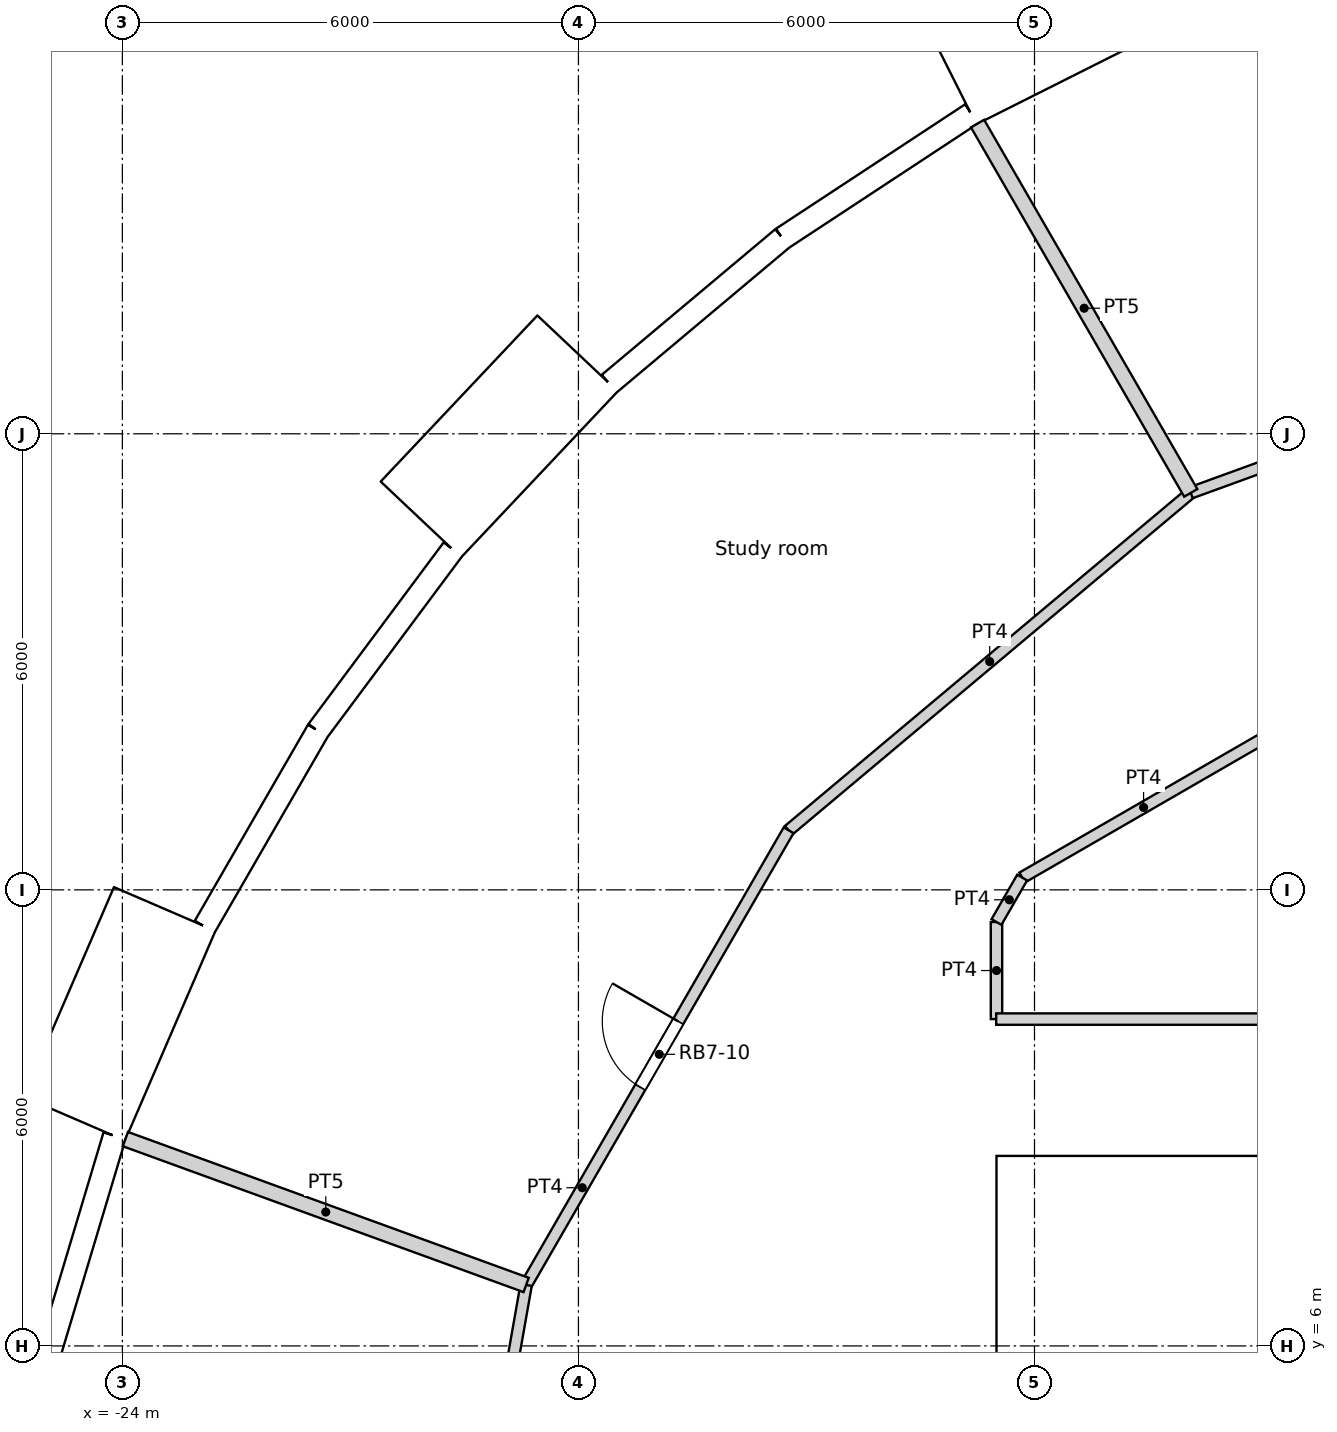
"""IFC4 building model, lengths in metres.
Left out: names, types, materials, properties, quantities, classifications, styles, units other than length and angle.
Written with IfcOpenShell. Run it as: python <this file> out.ifc"""

import sys

from ifc_helpers import new_model, si_unit, direction, frame, frame_2d, origin, origin_2d, place, context, subcontext, project, spatial, rectangle, circle, extrude, element, fill, save


model = new_model("IFC4")
c1 = context("Model", 3, precision=1e-05, world=origin(), true_north=direction((0.0, 1.0)))
c2 = subcontext(c1, "Body", "Model", "MODEL_VIEW")
j1 = project(units=[si_unit("LENGTHUNIT", "METRE"), si_unit("PLANEANGLEUNIT", "RADIAN")], contexts=[c1])
p1 = place(None, origin())
s1 = spatial("IfcSite", under=j1, at=p1, CompositionType="ELEMENT")
p2 = place(p1, origin())
s2 = spatial("IfcBuilding", under=s1, at=p2, CompositionType="ELEMENT")
p3 = place(p2, frame((0.0, 0.0, 190.8)))
s3 = spatial("IfcBuildingStorey", under=s2, at=p3, CompositionType="ELEMENT", Elevation=190.8)
for number, where, z_axis, x_axis in (
    (1, (-12.274, 21.259, 0.0), (0.0, 0.0, 1.0), (1.0, 0.0, 0.0)),
    (2, (-16.846, 17.855, 0.0), (0.0, 0.0, 1.0), (1.0, 0.0, 0.0)),
    (3, (-20.509, 13.489, 0.0), (0.0, 0.0, 1.0), (1.0, 0.0, 0.0)),
    (4, (-23.067, 8.396, 0.0), (0.0, 0.0, 1.0), (1.0, 0.0, 0.0)),
):
    element("IfcColumn", number, at=place(p3, frame(where, z_axis=z_axis, x_axis=x_axis)), inside=s3, PredefinedType="COLUMN", context=c2, shape_type="SweptSolid", body=[
        extrude(circle(Radius=0.6, at=origin_2d()), origin(), (0.0, 0.0, 1.0), 3.6),
    ])
for number, where, z_axis, x_axis in (
    (5, (-9.411, 16.301, 0.0), (0.0, 0.0, 1.0), (1.0, 0.0, 0.0)),
    (6, (-13.798, 12.802, 0.0), (0.0, 0.0, 1.0), (1.0, 0.0, 0.0)),
    (7, (-16.958, 8.167, 0.0), (0.0, 0.0, 1.0), (1.0, 0.0, 0.0)),
):
    element("IfcColumn", number, at=place(p3, frame(where, z_axis=z_axis, x_axis=x_axis)), inside=s3, PredefinedType="COLUMN", context=c2, shape_type="SweptSolid", body=[
        extrude(circle(Radius=0.65, at=origin_2d()), origin(), (0.0, 0.0, 1.0), 3.6),
    ])
p4 = place(p3, frame((-10.409, 24.068, -0.3), z_axis=(0.0, 0.0, 1.0), x_axis=(-0.893628249713, -0.448807922518, 0.0)))
e8 = element("IfcWall", 8, at=p4, inside=s3, PredefinedType="ELEMENTEDWALL", context=c2, shape_type="SweptSolid", body=[
    extrude(rectangle(XDim=3.0, YDim=1.45, at=frame_2d((1.5, 0.0))), origin(), (0.0, 0.0, 1.0), 3.6),
])
p5 = place(p4, frame((1.5, 0.0, 1.85)))
e9 = element("IfcOpeningElement", 9, at=p5, cuts=e8, PredefinedType="OPENING", context=c2, shape_type="SweptSolid", body=[
    extrude(circle(Radius=0.9, at=origin_2d()), frame((0.0, 0.735, 0.0), z_axis=(0.0, -1.0, 0.0), x_axis=(1.0, 0.0, 0.0)), (0.0, 0.0, 1.0), 1.47),
])
p6 = place(p3, frame((-12.832, 22.206, 0.0), z_axis=(0.0, 0.0, 1.0), x_axis=(-0.835508361394, -0.54947773207, 0.0)))
e10 = element("IfcWall", 10, at=p6, inside=s3, PredefinedType="SOLIDWALL", context=c2, shape_type="SweptSolid", body=[
    extrude(rectangle(XDim=2.973, YDim=0.3, at=frame_2d((1.486, 0.0))), origin(), (0.0, 0.0, 1.0), 2.8),
])
p7 = place(p6, frame((1.486, 0.0, 1.55)))
e11 = element("IfcOpeningElement", 11, at=p7, cuts=e10, PredefinedType="OPENING", context=c2, shape_type="SweptSolid", body=[
    extrude(circle(Radius=0.9, at=origin_2d()), frame((0.0, 0.16, 0.0), z_axis=(0.0, -1.0, 0.0), x_axis=(1.0, 0.0, 0.0)), (0.0, 0.0, 1.0), 0.32),
])
p8 = place(p3, frame((-15.316, 20.573, 0.0), z_axis=(0.0, 0.0, 1.0), x_axis=(-0.766008913364, -0.642829950023, 0.0)))
e12 = element("IfcWall", 12, at=p8, inside=s3, PredefinedType="SOLIDWALL", context=c2, shape_type="SweptSolid", body=[
    extrude(rectangle(XDim=2.973, YDim=0.3, at=frame_2d((1.486, 0.0))), origin(), (0.0, 0.0, 1.0), 3.3),
])
p9 = place(p8, frame((1.486, 0.0, 1.55)))
e13 = element("IfcOpeningElement", 13, at=p9, cuts=e12, PredefinedType="OPENING", context=c2, shape_type="SweptSolid", body=[
    extrude(circle(Radius=0.9, at=origin_2d()), frame((0.0, 0.16, 0.0), z_axis=(0.0, -1.0, 0.0), x_axis=(1.0, 0.0, 0.0)), (0.0, 0.0, 1.0), 0.32),
])
p10 = place(p3, frame((-18.013, 19.056, -0.3), z_axis=(0.0, 0.0, 1.0), x_axis=(-0.686217177108, -0.727396718334, 0.0)))
e14 = element("IfcWall", 14, at=p10, inside=s3, PredefinedType="ELEMENTEDWALL", context=c2, shape_type="SweptSolid", body=[
    extrude(rectangle(XDim=3.0, YDim=1.45, at=frame_2d((1.5, 0.0))), origin(), (0.0, 0.0, 1.0), 3.6),
])
p11 = place(p10, frame((1.5, 0.0, 1.85)))
e15 = element("IfcOpeningElement", 15, at=p11, cuts=e14, PredefinedType="OPENING", context=c2, shape_type="SweptSolid", body=[
    extrude(circle(Radius=0.9, at=origin_2d()), frame((0.0, 0.735, 0.0), z_axis=(0.0, -1.0, 0.0), x_axis=(1.0, 0.0, 0.0)), (0.0, 0.0, 1.0), 1.47),
])
p12 = place(p3, frame((-19.653, 16.478, 0.0), z_axis=(0.0, 0.0, 1.0), x_axis=(-0.597197580538, -0.80209416517, 0.0)))
e16 = element("IfcWall", 16, at=p12, inside=s3, PredefinedType="SOLIDWALL", context=c2, shape_type="SweptSolid", body=[
    extrude(rectangle(XDim=2.973, YDim=0.3, at=frame_2d((1.486, 0.0))), origin(), (0.0, 0.0, 1.0), 2.8),
])
p13 = place(p12, frame((1.486, 0.0, 1.55)))
e17 = element("IfcOpeningElement", 17, at=p13, cuts=e16, PredefinedType="OPENING", context=c2, shape_type="SweptSolid", body=[
    extrude(circle(Radius=0.9, at=origin_2d()), frame((0.0, 0.16, 0.0), z_axis=(0.0, -1.0, 0.0), x_axis=(1.0, 0.0, 0.0)), (0.0, 0.0, 1.0), 0.32),
])
p14 = place(p3, frame((-21.428, 14.094, 0.0), z_axis=(0.0, 0.0, 1.0), x_axis=(-0.499954672104, -0.866051572276, 0.0)))
e18 = element("IfcWall", 18, at=p14, inside=s3, PredefinedType="SOLIDWALL", context=c2, shape_type="SweptSolid", body=[
    extrude(rectangle(XDim=2.973, YDim=0.3, at=frame_2d((1.486, 0.0))), origin(), (0.0, 0.0, 1.0), 3.3),
])
p15 = place(p14, frame((1.486, 0.0, 1.55)))
e19 = element("IfcOpeningElement", 19, at=p15, cuts=e18, PredefinedType="OPENING", context=c2, shape_type="SweptSolid", body=[
    extrude(circle(Radius=0.9, at=origin_2d()), frame((0.0, 0.16, 0.0), z_axis=(0.0, -1.0, 0.0), x_axis=(1.0, 0.0, 0.0)), (0.0, 0.0, 1.0), 0.32),
])
p16 = place(p3, frame((-23.444, 11.746, -0.3), z_axis=(0.0, 0.0, 1.0), x_axis=(-0.396079003245, -0.918216435917, 0.0)))
e20 = element("IfcWall", 20, at=p16, inside=s3, PredefinedType="ELEMENTEDWALL", context=c2, shape_type="SweptSolid", body=[
    extrude(rectangle(XDim=3.0, YDim=1.45, at=frame_2d((1.5, 0.0))), origin(), (0.0, 0.0, 1.0), 3.6),
])
p17 = place(p16, frame((1.5, 0.0, 1.85)))
e21 = element("IfcOpeningElement", 21, at=p17, cuts=e20, PredefinedType="OPENING", context=c2, shape_type="SweptSolid", body=[
    extrude(circle(Radius=0.9, at=origin_2d()), frame((0.0, 0.735, 0.0), z_axis=(0.0, -1.0, 0.0), x_axis=(1.0, 0.0, 0.0)), (0.0, 0.0, 1.0), 1.47),
])
p18 = place(p3, frame((-24.104, 8.763, 0.0), z_axis=(0.0, 0.0, 1.0), x_axis=(-0.286782750849, -0.957995643944, 0.0)))
e22 = element("IfcWall", 22, at=p18, inside=s3, PredefinedType="SOLIDWALL", context=c2, shape_type="SweptSolid", body=[
    extrude(rectangle(XDim=2.973, YDim=0.3, at=frame_2d((1.486, 0.0))), origin(), (0.0, 0.0, 1.0), 2.8),
])
p19 = place(p18, frame((1.486, 0.0, 1.55)))
e23 = element("IfcOpeningElement", 23, at=p19, cuts=e22, PredefinedType="OPENING", context=c2, shape_type="SweptSolid", body=[
    extrude(circle(Radius=0.9, at=origin_2d()), frame((0.0, 0.16, 0.0), z_axis=(0.0, -1.0, 0.0), x_axis=(1.0, 0.0, 0.0)), (0.0, 0.0, 1.0), 0.32),
])
p20 = place(p3, frame((-24.956, 5.915, 0.0), z_axis=(0.0, 0.0, 1.0), x_axis=(-0.173686952598, -0.984800915159, 0.0)))
e24 = element("IfcWall", 24, at=p20, inside=s3, PredefinedType="SOLIDWALL", context=c2, shape_type="SweptSolid", body=[
    extrude(rectangle(XDim=2.973, YDim=0.3, at=frame_2d((1.486, 0.0))), origin(), (0.0, 0.0, 1.0), 3.3),
])
p21 = place(p20, frame((1.486, 0.0, 1.55)))
e25 = element("IfcOpeningElement", 25, at=p21, cuts=e24, PredefinedType="OPENING", context=c2, shape_type="SweptSolid", body=[
    extrude(circle(Radius=0.9, at=origin_2d()), frame((0.0, 0.16, 0.0), z_axis=(0.0, -1.0, 0.0), x_axis=(1.0, 0.0, 0.0)), (0.0, 0.0, 1.0), 0.32),
])
p22 = place(p3, frame((-12.5, 8.05, 0.0), z_axis=(0.0, 0.0, 1.0), x_axis=(1.0, 0.0, 0.0)))
e26 = element("IfcWall", 26, at=p22, inside=s3, PredefinedType="SOLIDWALL", context=c2, shape_type="SweptSolid", body=[
    extrude(rectangle(XDim=25.0, YDim=0.9, at=frame_2d((12.5, 0.0))), origin(), (0.0, 0.0, 1.0), 3.6),
])
p23 = place(p22, frame((8.3, 0.0, 0.0)))
e27 = element("IfcOpeningElement", 27, at=p23, cuts=e26, PredefinedType="OPENING", context=c2, shape_type="SweptSolid", body=[
    extrude(rectangle(XDim=1.8, YDim=2.1, at=frame_2d((0.9, 1.05))), frame((0.0, 0.45, 0.0), z_axis=(0.0, -1.0, 0.0), x_axis=(1.0, 0.0, 0.0)), (0.0, 0.0, 1.0), 0.9),
])
p24 = place(p3, frame((-12.05, -7.6, 0.0), z_axis=(0.0, 0.0, 1.0), x_axis=(0.0, 1.0, 0.0)))
e28 = element("IfcWall", 28, at=p24, inside=s3, PredefinedType="SOLIDWALL", context=c2, shape_type="SweptSolid", body=[
    extrude(rectangle(XDim=15.2, YDim=0.9, at=frame_2d((7.6, 0.0))), origin(), (0.0, 0.0, 1.0), 3.6),
])
p25 = place(p24, frame((7.1, 0.0, 0.0)))
e29 = element("IfcOpeningElement", 29, at=p25, cuts=e28, PredefinedType="OPENING", context=c2, shape_type="SweptSolid", body=[
    extrude(rectangle(XDim=1.0, YDim=2.1, at=frame_2d((0.5, 1.05))), frame((0.0, 0.45, 0.0), z_axis=(0.0, -1.0, 0.0), x_axis=(1.0, 0.0, 0.0)), (0.0, 0.0, 1.0), 0.9),
])
p26 = place(p3, frame((-9.05, -7.0, 0.0), z_axis=(0.0, 0.0, 1.0), x_axis=(0.0, 1.0, 0.0)))
e30 = element("IfcWall", 30, at=p26, inside=s3, PredefinedType="SOLIDWALL", context=c2, shape_type="SweptSolid", body=[
    extrude(rectangle(XDim=14.6, YDim=0.3, at=frame_2d((7.3, 0.0))), origin(), (0.0, 0.0, 1.0), 3.3),
])
p27 = place(p3, frame((-12.504, 10.3, 0.0), z_axis=(0.0, 0.0, 1.0), x_axis=(1.0, 0.0, 0.0)))
e31 = element("IfcWall", 31, at=p27, inside=s3, PredefinedType="PARTITIONING", context=c2, shape_type="SweptSolid", body=[
    extrude(rectangle(XDim=7.687, YDim=0.15, at=frame_2d((3.844, 0.0))), origin(), (0.0, 0.0, 1.0), 3.3),
])
p28 = place(p3, frame((-12.162, 12.162, 0.0), z_axis=(0.0, 0.0, 1.0), x_axis=(0.866004766557, 0.500035743023, 0.0)))
e32 = element("IfcWall", 32, at=p28, inside=s3, PredefinedType="PARTITIONING", context=c2, shape_type="SweptSolid", body=[
    extrude(rectangle(XDim=8.477, YDim=0.15, at=frame_2d((4.239, 0.0))), origin(), (0.0, 0.0, 1.0), 3.3),
])
p29 = place(p28, frame((3.739, 0.0, 0.0)))
e33 = element("IfcOpeningElement", 33, at=p29, cuts=e32, PredefinedType="OPENING", context=c2, shape_type="SweptSolid", body=[
    extrude(rectangle(XDim=1.0, YDim=2.04, at=frame_2d((0.5, 1.02))), frame((0.0, 0.075, 0.0), z_axis=(0.0, -1.0, 0.0), x_axis=(1.0, 0.0, 0.0)), (0.0, 0.0, 1.0), 0.15),
])
p30 = place(p3, frame((-9.944, 17.223, 0.0), z_axis=(0.0, 0.0, 1.0), x_axis=(0.939672634566, 0.342075050021, 0.0)))
e34 = element("IfcWall", 34, at=p30, inside=s3, PredefinedType="PARTITIONING", context=c2, shape_type="SweptSolid", body=[
    extrude(rectangle(XDim=6.908, YDim=0.15, at=frame_2d((3.454, 0.0))), origin(), (0.0, 0.0, 1.0), 3.3),
])
p31 = place(p30, frame((2.704, 0.0, 0.0)))
e35 = element("IfcOpeningElement", 35, at=p31, cuts=e34, PredefinedType="OPENING", context=c2, shape_type="SweptSolid", body=[
    extrude(rectangle(XDim=1.5, YDim=2.1, at=frame_2d((0.75, 1.05))), frame((0.0, 0.075, 0.0), z_axis=(0.0, -1.0, 0.0), x_axis=(1.0, 0.0, 0.0)), (0.0, 0.0, 1.0), 0.15),
])
p32 = place(p3, frame((-15.235, 12.784, 0.0), z_axis=(0.0, 0.0, 1.0), x_axis=(0.766064078986, 0.642764207845, 0.0)))
e36 = element("IfcWall", 36, at=p32, inside=s3, PredefinedType="PARTITIONING", context=c2, shape_type="SweptSolid", body=[
    extrude(rectangle(XDim=6.906, YDim=0.15, at=frame_2d((3.453, 0.0))), origin(), (0.0, 0.0, 1.0), 3.3),
])
p33 = place(p3, frame((-12.5, 11.577, 0.0), z_axis=(0.0, 0.0, 1.0), x_axis=(0.500024767483, 0.866011103799, 0.0)))
e37 = element("IfcWall", 37, at=p33, inside=s3, PredefinedType="PARTITIONING", context=c2, shape_type="SweptSolid", body=[
    extrude(rectangle(XDim=0.676, YDim=0.15, at=frame_2d((0.338, 0.0))), origin(), (0.0, 0.0, 1.0), 3.3),
])
p34 = place(p3, frame((-12.5, 10.3, 0.0), z_axis=(0.0, 0.0, 1.0), x_axis=(0.0, 1.0, 0.0)))
e38 = element("IfcWall", 38, at=p34, inside=s3, PredefinedType="PARTITIONING", context=c2, shape_type="SweptSolid", body=[
    extrude(rectangle(XDim=1.277, YDim=0.15, at=frame_2d((0.638, 0.0))), origin(), (0.0, 0.0, 1.0), 3.3),
])
p35 = place(p3, frame((-18.688, 6.802, 0.0), z_axis=(0.0, 0.0, 1.0), x_axis=(0.499914202267, 0.866074933462, 0.0)))
e39 = element("IfcWall", 39, at=p35, inside=s3, PredefinedType="PARTITIONING", context=c2, shape_type="SweptSolid", body=[
    extrude(rectangle(XDim=6.907, YDim=0.15, at=frame_2d((3.454, 0.0))), origin(), (0.0, 0.0, 1.0), 3.3),
])
p36 = place(p35, frame((3.004, 0.0, 0.0)))
e40 = element("IfcOpeningElement", 40, at=p36, cuts=e39, PredefinedType="OPENING", context=c2, shape_type="SweptSolid", body=[
    extrude(rectangle(XDim=1.0, YDim=2.04, at=frame_2d((0.5, 1.02))), frame((0.0, 0.075, 0.0), z_axis=(0.0, -1.0, 0.0), x_axis=(1.0, 0.0, 0.0)), (0.0, 0.0, 1.0), 0.15),
])
p37 = place(p3, frame((-19.888, 0.0, 0.0), z_axis=(0.0, 0.0, 1.0), x_axis=(0.173728873845, 0.98479352069, 0.0)))
e41 = element("IfcWall", 41, at=p37, inside=s3, PredefinedType="PARTITIONING", context=c2, shape_type="SweptSolid", body=[
    extrude(rectangle(XDim=6.907, YDim=0.15, at=frame_2d((3.454, 0.0))), origin(), (0.0, 0.0, 1.0), 3.3),
])
p38 = place(p37, frame((3.979, 0.0, 0.0)))
e42 = element("IfcOpeningElement", 42, at=p38, cuts=e41, PredefinedType="OPENING", context=c2, shape_type="SweptSolid", body=[
    extrude(rectangle(XDim=0.95, YDim=2.1, at=frame_2d((0.475, 1.05))), frame((0.0, 0.075, 0.0), z_axis=(0.0, -1.0, 0.0), x_axis=(1.0, 0.0, 0.0)), (0.0, 0.0, 1.0), 0.15),
])
p39 = place(p3, frame((-12.749, 22.081, 0.0), z_axis=(0.0, 0.0, 1.0), x_axis=(0.500010020406, -0.866019618423, 0.0)))
e43 = element("IfcWall", 43, at=p39, inside=s3, PredefinedType="PARTITIONING", context=c2, shape_type="SweptSolid", body=[
    extrude(rectangle(XDim=5.61, YDim=0.2, at=frame_2d((2.805, 0.0))), origin(), (0.0, 0.0, 1.0), 3.3),
])
p40 = place(p3, frame((-23.96, 8.721, 0.0), z_axis=(0.0, 0.0, 1.0), x_axis=(0.939686652043, -0.342036541866, 0.0)))
e44 = element("IfcWall", 44, at=p40, inside=s3, PredefinedType="PARTITIONING", context=c2, shape_type="SweptSolid", body=[
    extrude(rectangle(XDim=5.61, YDim=0.2, at=frame_2d((2.805, 0.0))), origin(), (0.0, 0.0, 1.0), 3.3),
])
p41 = place(p5, origin())
e45 = element("IfcWindow", 45, at=p41, inside=s3, PartitioningType="SINGLE_PANEL", PredefinedType="WINDOW", context=c2, shape_type="SweptSolid", body=[
    extrude(circle(Radius=0.9, at=origin_2d()), frame((0.0, 0.695, 0.0), z_axis=(0.0, -1.0, 0.0), x_axis=(1.0, 0.0, 0.0)), (0.0, 0.0, 1.0), 0.1),
])
fill(e9, e45)
p42 = place(p7, origin())
e46 = element("IfcWindow", 46, at=p42, inside=s3, PartitioningType="SINGLE_PANEL", PredefinedType="WINDOW", context=c2, shape_type="SweptSolid", body=[
    extrude(circle(Radius=0.9, at=origin_2d()), frame((0.0, 0.12, 0.0), z_axis=(0.0, -1.0, 0.0), x_axis=(1.0, 0.0, 0.0)), (0.0, 0.0, 1.0), 0.1),
])
fill(e11, e46)
p43 = place(p9, origin())
e47 = element("IfcWindow", 47, at=p43, inside=s3, PartitioningType="SINGLE_PANEL", PredefinedType="WINDOW", context=c2, shape_type="SweptSolid", body=[
    extrude(circle(Radius=0.9, at=origin_2d()), frame((0.0, 0.12, 0.0), z_axis=(0.0, -1.0, 0.0), x_axis=(1.0, 0.0, 0.0)), (0.0, 0.0, 1.0), 0.1),
])
fill(e13, e47)
p44 = place(p11, origin())
e48 = element("IfcWindow", 48, at=p44, inside=s3, PartitioningType="SINGLE_PANEL", PredefinedType="WINDOW", context=c2, shape_type="SweptSolid", body=[
    extrude(circle(Radius=0.9, at=origin_2d()), frame((0.0, 0.695, 0.0), z_axis=(0.0, -1.0, 0.0), x_axis=(1.0, 0.0, 0.0)), (0.0, 0.0, 1.0), 0.1),
])
fill(e15, e48)
p45 = place(p13, origin())
e49 = element("IfcWindow", 49, at=p45, inside=s3, PartitioningType="SINGLE_PANEL", PredefinedType="WINDOW", context=c2, shape_type="SweptSolid", body=[
    extrude(circle(Radius=0.9, at=origin_2d()), frame((0.0, 0.12, 0.0), z_axis=(0.0, -1.0, 0.0), x_axis=(1.0, 0.0, 0.0)), (0.0, 0.0, 1.0), 0.1),
])
fill(e17, e49)
p46 = place(p15, origin())
e50 = element("IfcWindow", 50, at=p46, inside=s3, PartitioningType="SINGLE_PANEL", PredefinedType="WINDOW", context=c2, shape_type="SweptSolid", body=[
    extrude(circle(Radius=0.9, at=origin_2d()), frame((0.0, 0.12, 0.0), z_axis=(0.0, -1.0, 0.0), x_axis=(1.0, 0.0, 0.0)), (0.0, 0.0, 1.0), 0.1),
])
fill(e19, e50)
p47 = place(p17, origin())
e51 = element("IfcWindow", 51, at=p47, inside=s3, PartitioningType="SINGLE_PANEL", PredefinedType="WINDOW", context=c2, shape_type="SweptSolid", body=[
    extrude(circle(Radius=0.9, at=origin_2d()), frame((0.0, 0.695, 0.0), z_axis=(0.0, -1.0, 0.0), x_axis=(1.0, 0.0, 0.0)), (0.0, 0.0, 1.0), 0.1),
])
fill(e21, e51)
p48 = place(p19, origin())
e52 = element("IfcWindow", 52, at=p48, inside=s3, PartitioningType="SINGLE_PANEL", PredefinedType="WINDOW", context=c2, shape_type="SweptSolid", body=[
    extrude(circle(Radius=0.9, at=origin_2d()), frame((0.0, 0.12, 0.0), z_axis=(0.0, -1.0, 0.0), x_axis=(1.0, 0.0, 0.0)), (0.0, 0.0, 1.0), 0.1),
])
fill(e23, e52)
p49 = place(p36, origin())
e53 = element("IfcDoor", 53, at=p49, inside=s3, OperationType="SINGLE_SWING_RIGHT", PredefinedType="DOOR", context=c2, shape_type="SweptSolid", body=[
    extrude(rectangle(XDim=1.0, YDim=2.04, at=frame_2d((0.5, 1.02))), frame((0.0, 0.025, 0.0), z_axis=(0.0, -1.0, 0.0), x_axis=(1.0, 0.0, 0.0)), (0.0, 0.0, 1.0), 0.05),
])
fill(e40, e53)
save(model, sys.argv[1])
